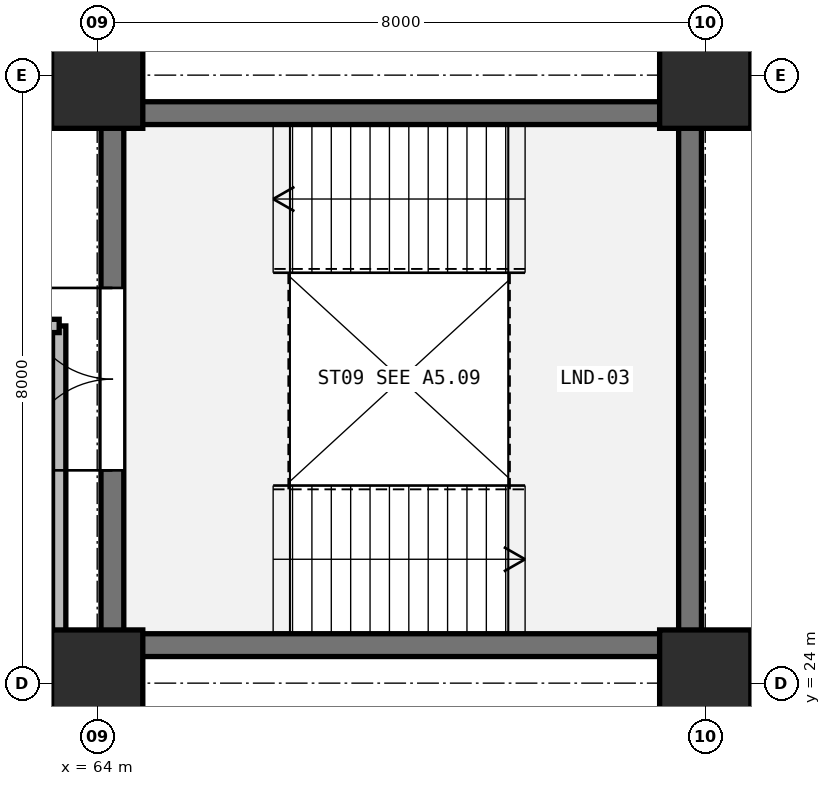
"""IFC4 building model, lengths in metres.
Left out: names, types, materials, properties, quantities, classifications, styles, units other than length and angle.
Written with IfcOpenShell. Run it as: python <this file> out.ifc"""

import sys

from ifc_helpers import new_model, si_unit, direction, frame, frame_2d, origin, origin_2d, place, context, subcontext, project, spatial, rectangle, extrude, element, fill, save


model = new_model("IFC4")
c1 = context("Model", 3, precision=1e-05, world=origin(), true_north=direction((0.0, 1.0)))
c2 = subcontext(c1, "Body", "Model", "MODEL_VIEW")
j1 = project(units=[si_unit("LENGTHUNIT", "METRE"), si_unit("PLANEANGLEUNIT", "RADIAN")], contexts=[c1])
p1 = place(None, origin())
s1 = spatial("IfcSite", under=j1, at=p1, CompositionType="ELEMENT")
p2 = place(p1, origin())
s2 = spatial("IfcBuilding", under=s1, at=p2, CompositionType="ELEMENT")
p3 = place(p2, frame((0.0, 0.0, 5.4)))
s3 = spatial("IfcBuildingStorey", under=s2, at=p3, CompositionType="ELEMENT", Elevation=5.4)
for number, where, z_axis, x_axis in (
    (1, (64.0, 24.0, 0.0), (0.0, 0.0, 1.0), (1.0, 0.0, 0.0)),
    (2, (64.0, 32.0, 0.0), (0.0, 0.0, 1.0), (1.0, 0.0, 0.0)),
    (3, (72.0, 24.0, 0.0), (0.0, 0.0, 1.0), (1.0, 0.0, 0.0)),
    (4, (72.0, 32.0, 0.0), (0.0, 0.0, 1.0), (1.0, 0.0, 0.0)),
):
    element("IfcColumn", number, at=place(p3, frame(where, z_axis=z_axis, x_axis=x_axis)), inside=s3, PredefinedType="COLUMN", context=c2, shape_type="SweptSolid", body=[
        extrude(rectangle(XDim=1.2, YDim=1.4, at=origin_2d()), origin(), (0.0, 0.0, 1.0), 4.8),
    ])
p4 = place(p3, frame((71.8, 24.5, 0.0), z_axis=(0.0, 0.0, 1.0), x_axis=(-1.0, 0.0, 0.0)))
e5 = element("IfcWall", 5, at=p4, inside=s3, PredefinedType="SHEAR", context=c2, shape_type="SweptSolid", body=[
    extrude(rectangle(XDim=7.6, YDim=0.3, at=frame_2d((3.8, 0.0))), origin(), (0.0, 0.0, 1.0), 4.48),
])
p5 = place(p3, frame((64.2, 24.5, 0.0), z_axis=(0.0, 0.0, 1.0), x_axis=(0.0, 1.0, 0.0)))
e6 = element("IfcWall", 6, at=p5, inside=s3, PredefinedType="SHEAR", context=c2, shape_type="SweptSolid", body=[
    extrude(rectangle(XDim=7.0, YDim=0.3, at=frame_2d((3.5, 0.0))), origin(), (0.0, 0.0, 1.0), 4.48),
])
p6 = place(p5, frame((2.3, 0.0, 0.0)))
e7 = element("IfcOpeningElement", 7, at=p6, cuts=e6, PredefinedType="OPENING", context=c2, shape_type="SweptSolid", body=[
    extrude(rectangle(XDim=2.4, YDim=2.2, at=frame_2d((1.2, 1.1))), frame((0.0, 0.16, 0.0), z_axis=(0.0, -1.0, 0.0), x_axis=(1.0, 0.0, 0.0)), (0.0, 0.0, 1.0), 0.32),
])
p7 = place(p3, frame((64.2, 31.5, 0.0), z_axis=(0.0, 0.0, 1.0), x_axis=(1.0, 0.0, 0.0)))
e8 = element("IfcWall", 8, at=p7, inside=s3, PredefinedType="SHEAR", context=c2, shape_type="SweptSolid", body=[
    extrude(rectangle(XDim=7.6, YDim=0.3, at=frame_2d((3.8, 0.0))), origin(), (0.0, 0.0, 1.0), 4.48),
])
p8 = place(p3, frame((71.8, 31.5, 0.0), z_axis=(0.0, 0.0, 1.0), x_axis=(0.0, -1.0, 0.0)))
e9 = element("IfcWall", 9, at=p8, inside=s3, PredefinedType="SHEAR", context=c2, shape_type="SweptSolid", body=[
    extrude(rectangle(XDim=7.0, YDim=0.3, at=frame_2d((3.5, 0.0))), origin(), (0.0, 0.0, 1.0), 4.48),
])
p9 = place(p3, frame((60.3, 24.5, 0.0), z_axis=(0.0, 0.0, 1.0), x_axis=(1.0, 0.0, 0.0)))
e10 = element("IfcWall", 10, at=p9, inside=s3, PredefinedType="PARTITIONING", context=c2, shape_type="SweptSolid", body=[
    extrude(rectangle(XDim=3.2, YDim=0.175, at=frame_2d((1.6, 0.0))), origin(), (0.0, 0.0, 1.0), 4.48),
])
p10 = place(p3, frame((63.5, 24.5, 0.0), z_axis=(0.0, 0.0, 1.0), x_axis=(0.0, 1.0, 0.0)))
e11 = element("IfcWall", 11, at=p10, inside=s3, PredefinedType="PARTITIONING", context=c2, shape_type="SweptSolid", body=[
    extrude(rectangle(XDim=4.2, YDim=0.175, at=frame_2d((2.1, 0.0))), origin(), (0.0, 0.0, 1.0), 3.6),
])
p11 = place(p3, frame((63.5, 28.7, 0.0), z_axis=(0.0, 0.0, 1.0), x_axis=(-1.0, 0.0, 0.0)))
e12 = element("IfcWall", 12, at=p11, inside=s3, PredefinedType="PARTITIONING", context=c2, shape_type="SweptSolid", body=[
    extrude(rectangle(XDim=3.2, YDim=0.175, at=frame_2d((1.6, 0.0))), origin(), (0.0, 0.0, 1.0), 4.48),
])
p12 = place(p11, frame((1.125, 0.0, 0.0)))
e13 = element("IfcOpeningElement", 13, at=p12, cuts=e12, PredefinedType="OPENING", context=c2, shape_type="SweptSolid", body=[
    extrude(rectangle(XDim=0.95, YDim=2.15, at=frame_2d((0.475, 1.075))), frame((0.0, 0.098, 0.0), z_axis=(0.0, -1.0, 0.0), x_axis=(1.0, 0.0, 0.0)), (0.0, 0.0, 1.0), 0.195),
])
p13 = place(p6, frame((2.4, 0.0, 0.0), z_axis=(0.0, 0.0, 1.0), x_axis=(-1.0, 0.0, 0.0)))
e14 = element("IfcDoor", 14, at=p13, inside=s3, OperationType="DOUBLE_DOOR_SINGLE_SWING", PredefinedType="DOOR", context=c2, shape_type="SweptSolid", body=[
    extrude(rectangle(XDim=2.4, YDim=2.2, at=frame_2d((1.2, 1.1))), frame((0.0, 0.025, 0.0), z_axis=(0.0, -1.0, 0.0), x_axis=(1.0, 0.0, 0.0)), (0.0, 0.0, 1.0), 0.05),
])
fill(e7, e14)
save(model, sys.argv[1])
